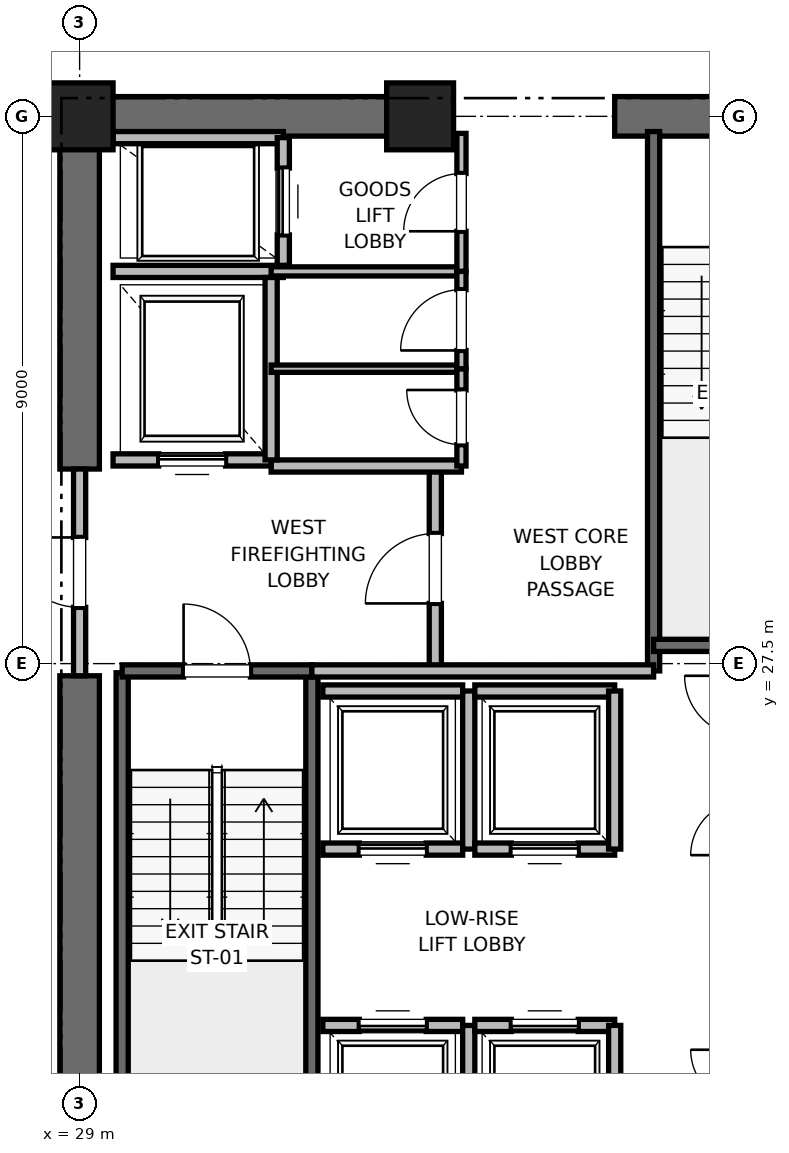
"""IFC4 building model, lengths in metres.
Left out: names, types, materials, properties, quantities, classifications, styles, units other than length and angle.
Written with IfcOpenShell. Run it as: python <this file> out.ifc"""

import sys

from ifc_helpers import new_model, si_unit, direction, frame, frame_2d, origin, origin_2d, place, context, subcontext, project, spatial, rectangle, extrude, element, fill, save


model = new_model("IFC4")
c1 = context("Model", 3, precision=1e-05, world=origin(), true_north=direction((0.0, 1.0)))
c2 = subcontext(c1, "Body", "Model", "MODEL_VIEW")
j1 = project(units=[si_unit("LENGTHUNIT", "METRE"), si_unit("PLANEANGLEUNIT", "RADIAN")], contexts=[c1])
p1 = place(None, origin())
s1 = spatial("IfcSite", under=j1, at=p1, CompositionType="ELEMENT")
p2 = place(p1, origin())
s2 = spatial("IfcBuilding", under=s1, at=p2, CompositionType="ELEMENT")
p3 = place(p2, frame((0.0, 0.0, 39.6)))
s3 = spatial("IfcBuildingStorey", under=s2, at=p3, CompositionType="ELEMENT", Elevation=39.6)
for number, where, z_axis, x_axis in (
    (1, (29.0, 36.5, 0.0), (0.0, 0.0, 1.0), (1.0, 0.0, 0.0)),
    (2, (34.6, 36.5, 0.0), (0.0, 0.0, 1.0), (1.0, 0.0, 0.0)),
):
    element("IfcColumn", number, at=place(p3, frame(where, z_axis=z_axis, x_axis=x_axis)), inside=s3, PredefinedType="PILASTER", context=c2, shape_type="SweptSolid", body=[
        extrude(rectangle(XDim=1.1, YDim=1.1, at=origin_2d()), origin(), (0.0, 0.0, 1.0), 4.0),
    ])
p4 = place(p3, frame((29.0, 36.5, 0.0), z_axis=(0.0, 0.0, 1.0), x_axis=(1.0, 0.0, 0.0)))
e3 = element("IfcWall", 3, at=p4, inside=s3, PredefinedType="SHEAR", context=c2, shape_type="SweptSolid", body=[
    extrude(rectangle(XDim=5.8, YDim=0.65, at=frame_2d((2.9, 0.0))), origin(), (0.0, 0.0, 1.0), 3.76),
])
p5 = place(p3, frame((37.8, 36.5, 0.0), z_axis=(0.0, 0.0, 1.0), x_axis=(1.0, 0.0, 0.0)))
e4 = element("IfcWall", 4, at=p5, inside=s3, PredefinedType="SHEAR", context=c2, shape_type="SweptSolid", body=[
    extrude(rectangle(XDim=4.4, YDim=0.65, at=frame_2d((2.2, 0.0))), origin(), (0.0, 0.0, 1.0), 3.76),
])
p6 = place(p5, frame((1.65, 0.0, 0.0)))
e5 = element("IfcOpeningElement", 5, at=p6, cuts=e4, PredefinedType="OPENING", context=c2, shape_type="SweptSolid", body=[
    extrude(rectangle(XDim=1.1, YDim=2.15, at=frame_2d((0.55, 1.075))), frame((0.0, 0.325, 0.0), z_axis=(0.0, -1.0, 0.0), x_axis=(1.0, 0.0, 0.0)), (0.0, 0.0, 1.0), 0.65),
])
p7 = place(p3, frame((29.0, 18.5, 0.0), z_axis=(0.0, 0.0, 1.0), x_axis=(0.0, 1.0, 0.0)))
e6 = element("IfcWall", 6, at=p7, inside=s3, PredefinedType="SHEAR", context=c2, shape_type="SweptSolid", body=[
    extrude(rectangle(XDim=8.8, YDim=0.65, at=frame_2d((4.4, 0.0))), origin(), (0.0, 0.0, 1.0), 3.76),
])
p8 = place(p3, frame((29.0, 30.7, 0.0), z_axis=(0.0, 0.0, 1.0), x_axis=(0.0, 1.0, 0.0)))
e7 = element("IfcWall", 7, at=p8, inside=s3, PredefinedType="SHEAR", context=c2, shape_type="SweptSolid", body=[
    extrude(rectangle(XDim=5.8, YDim=0.65, at=frame_2d((2.9, 0.0))), origin(), (0.0, 0.0, 1.0), 3.76),
])
p9 = place(p3, frame((29.7, 19.2, 0.0), z_axis=(0.0, 0.0, 1.0), x_axis=(0.0, 1.0, 0.0)))
e8 = element("IfcWall", 8, at=p9, inside=s3, PredefinedType="SOLIDWALL", context=c2, shape_type="SweptSolid", body=[
    extrude(rectangle(XDim=8.15, YDim=0.2, at=frame_2d((4.075, 0.0))), origin(), (0.0, 0.0, 1.0), 3.76),
])
p10 = place(p3, frame((32.82, 18.6, 0.0), z_axis=(0.0, 0.0, 1.0), x_axis=(0.0, 1.0, 0.0)))
e9 = element("IfcWall", 9, at=p10, inside=s3, PredefinedType="SOLIDWALL", context=c2, shape_type="SweptSolid", body=[
    extrude(rectangle(XDim=8.78, YDim=0.2, at=frame_2d((4.39, 0.0))), origin(), (0.0, 0.0, 1.0), 3.76),
])
p11 = place(p3, frame((29.7, 27.38, 0.0), z_axis=(0.0, 0.0, 1.0), x_axis=(1.0, 0.0, 0.0)))
e10 = element("IfcWall", 10, at=p11, inside=s3, PredefinedType="SOLIDWALL", context=c2, shape_type="SweptSolid", body=[
    extrude(rectangle(XDim=3.12, YDim=0.2, at=frame_2d((1.56, 0.0))), origin(), (0.0, 0.0, 1.0), 3.76),
])
p12 = place(p11, frame((1.01, 0.0, 0.0)))
e11 = element("IfcOpeningElement", 11, at=p12, cuts=e10, PredefinedType="OPENING", context=c2, shape_type="SweptSolid", body=[
    extrude(rectangle(XDim=1.1, YDim=2.15, at=frame_2d((0.55, 1.075))), frame((0.0, 0.1, 0.0), z_axis=(0.0, -1.0, 0.0), x_axis=(1.0, 0.0, 0.0)), (0.0, 0.0, 1.0), 0.2),
])
p13 = place(p3, frame((38.44, 27.38, 0.0), z_axis=(0.0, 0.0, 1.0), x_axis=(0.0, 1.0, 0.0)))
e12 = element("IfcWall", 12, at=p13, inside=s3, PredefinedType="SOLIDWALL", context=c2, shape_type="SweptSolid", body=[
    extrude(rectangle(XDim=8.87, YDim=0.2, at=frame_2d((4.435, 0.0))), origin(), (0.0, 0.0, 1.0), 3.76),
])
p14 = place(p3, frame((38.44, 27.8, 0.0), z_axis=(0.0, 0.0, 1.0), x_axis=(1.0, 0.0, 0.0)))
e13 = element("IfcWall", 13, at=p14, inside=s3, PredefinedType="SOLIDWALL", context=c2, shape_type="SweptSolid", body=[
    extrude(rectangle(XDim=3.32, YDim=0.2, at=frame_2d((1.66, 0.0))), origin(), (0.0, 0.0, 1.0), 3.76),
])
p15 = place(p3, frame((34.85, 27.38, 0.0), z_axis=(0.0, 0.0, 1.0), x_axis=(0.0, 1.0, 0.0)))
e14 = element("IfcWall", 14, at=p15, inside=s3, PredefinedType="PARTITIONING", context=c2, shape_type="SweptSolid", body=[
    extrude(rectangle(XDim=3.37, YDim=0.2, at=frame_2d((1.685, 0.0))), origin(), (0.0, 0.0, 1.0), 3.76),
])
p16 = place(p15, frame((1.11, 0.0, 0.0)))
e15 = element("IfcOpeningElement", 15, at=p16, cuts=e14, PredefinedType="OPENING", context=c2, shape_type="SweptSolid", body=[
    extrude(rectangle(XDim=1.15, YDim=2.2, at=frame_2d((0.575, 1.1))), frame((0.0, 0.1, 0.0), z_axis=(0.0, -1.0, 0.0), x_axis=(1.0, 0.0, 0.0)), (0.0, 0.0, 1.0), 0.2),
])
p17 = place(p3, frame((29.0, 27.3, 0.0), z_axis=(0.0, 0.0, 1.0), x_axis=(0.0, 1.0, 0.0)))
e16 = element("IfcWall", 16, at=p17, inside=s3, PredefinedType="PARTITIONING", context=c2, shape_type="SweptSolid", body=[
    extrude(rectangle(XDim=3.4, YDim=0.2, at=frame_2d((1.7, 0.0))), origin(), (0.0, 0.0, 1.0), 2.54),
])
p18 = place(p17, frame((1.125, 0.0, 0.0)))
e17 = element("IfcOpeningElement", 17, at=p18, cuts=e16, PredefinedType="OPENING", context=c2, shape_type="SweptSolid", body=[
    extrude(rectangle(XDim=1.15, YDim=2.2, at=frame_2d((0.575, 1.1))), frame((0.0, 0.1, 0.0), z_axis=(0.0, -1.0, 0.0), x_axis=(1.0, 0.0, 0.0)), (0.0, 0.0, 1.0), 0.2),
])
p19 = place(p3, frame((32.82, 27.38, 0.0), z_axis=(0.0, 0.0, 1.0), x_axis=(1.0, 0.0, 0.0)))
e18 = element("IfcWall", 18, at=p19, inside=s3, PredefinedType="PARTITIONING", context=c2, shape_type="SweptSolid", body=[
    extrude(rectangle(XDim=5.62, YDim=0.2, at=frame_2d((2.81, 0.0))), origin(), (0.0, 0.0, 1.0), 3.76),
])
p20 = place(p3, frame((32.15, 30.75, 0.0), z_axis=(0.0, 0.0, 1.0), x_axis=(1.0, 0.0, 0.0)))
e19 = element("IfcWall", 19, at=p20, inside=s3, PredefinedType="PARTITIONING", context=c2, shape_type="SweptSolid", body=[
    extrude(rectangle(XDim=3.13, YDim=0.2, at=frame_2d((1.565, 0.0))), origin(), (0.0, 0.0, 1.0), 3.76),
])
p21 = place(p3, frame((29.55, 30.85, 0.0), z_axis=(0.0, 0.0, 1.0), x_axis=(1.0, 0.0, 0.0)))
e20 = element("IfcWall", 20, at=p21, inside=s3, PredefinedType="SOLIDWALL", context=c2, shape_type="SweptSolid", body=[
    extrude(rectangle(XDim=2.6, YDim=0.2, at=frame_2d((1.3, 0.0))), origin(), (0.0, 0.0, 1.0), 2.54),
])
p22 = place(p21, frame((0.75, 0.0, 0.0)))
e21 = element("IfcOpeningElement", 21, at=p22, cuts=e20, PredefinedType="OPENING", context=c2, shape_type="SweptSolid", body=[
    extrude(rectangle(XDim=1.1, YDim=2.2, at=frame_2d((0.55, 1.1))), frame((0.0, 0.1, 0.0), z_axis=(0.0, -1.0, 0.0), x_axis=(1.0, 0.0, 0.0)), (0.0, 0.0, 1.0), 0.2),
])
p23 = place(p3, frame((29.55, 33.95, 0.0), z_axis=(0.0, 0.0, 1.0), x_axis=(1.0, 0.0, 0.0)))
e22 = element("IfcWall", 22, at=p23, inside=s3, PredefinedType="SOLIDWALL", context=c2, shape_type="SweptSolid", body=[
    extrude(rectangle(XDim=2.8, YDim=0.2, at=frame_2d((1.4, 0.0))), origin(), (0.0, 0.0, 1.0), 3.76),
])
p24 = place(p3, frame((32.15, 30.85, 0.0), z_axis=(0.0, 0.0, 1.0), x_axis=(0.0, 1.0, 0.0)))
e23 = element("IfcWall", 23, at=p24, inside=s3, PredefinedType="SOLIDWALL", context=c2, shape_type="SweptSolid", body=[
    extrude(rectangle(XDim=3.0, YDim=0.2, at=frame_2d((1.5, 0.0))), origin(), (0.0, 0.0, 1.0), 3.76),
])
p25 = place(p3, frame((32.35, 36.15, 0.0), z_axis=(0.0, 0.0, 1.0), x_axis=(-1.0, 0.0, 0.0)))
e24 = element("IfcWall", 24, at=p25, inside=s3, PredefinedType="SOLIDWALL", context=c2, shape_type="SweptSolid", body=[
    extrude(rectangle(XDim=2.8, YDim=0.2, at=frame_2d((1.4, 0.0))), origin(), (0.0, 0.0, 1.0), 2.889),
])
p26 = place(p3, frame((32.35, 34.05, 0.0), z_axis=(0.0, 0.0, 1.0), x_axis=(0.0, 1.0, 0.0)))
e25 = element("IfcWall", 25, at=p26, inside=s3, PredefinedType="SOLIDWALL", context=c2, shape_type="SweptSolid", body=[
    extrude(rectangle(XDim=2.1, YDim=0.2, at=frame_2d((1.05, 0.0))), origin(), (0.0, 0.0, 1.0), 3.76),
])
p27 = place(p26, frame((0.5, 0.0, 0.0)))
e26 = element("IfcOpeningElement", 26, at=p27, cuts=e25, PredefinedType="OPENING", context=c2, shape_type="SweptSolid", body=[
    extrude(rectangle(XDim=1.1, YDim=2.2, at=frame_2d((0.55, 1.1))), frame((0.0, 0.1, 0.0), z_axis=(0.0, -1.0, 0.0), x_axis=(1.0, 0.0, 0.0)), (0.0, 0.0, 1.0), 0.2),
])
p28 = place(p3, frame((35.3, 21.55, 0.0), z_axis=(0.0, 0.0, 1.0), x_axis=(-1.0, 0.0, 0.0)))
e27 = element("IfcWall", 27, at=p28, inside=s3, PredefinedType="SOLIDWALL", context=c2, shape_type="SweptSolid", body=[
    extrude(rectangle(XDim=2.3, YDim=0.2, at=frame_2d((1.15, 0.0))), origin(), (0.0, 0.0, 1.0), 3.76),
])
p29 = place(p28, frame((0.6, 0.0, 0.0)))
e28 = element("IfcOpeningElement", 28, at=p29, cuts=e27, PredefinedType="OPENING", context=c2, shape_type="SweptSolid", body=[
    extrude(rectangle(XDim=1.1, YDim=2.2, at=frame_2d((0.55, 1.1))), frame((0.0, 0.1, 0.0), z_axis=(0.0, -1.0, 0.0), x_axis=(1.0, 0.0, 0.0)), (0.0, 0.0, 1.0), 0.2),
])
p30 = place(p3, frame((35.4, 18.95, 0.0), z_axis=(0.0, 0.0, 1.0), x_axis=(0.0, 1.0, 0.0)))
e29 = element("IfcWall", 29, at=p30, inside=s3, PredefinedType="SOLIDWALL", context=c2, shape_type="SweptSolid", body=[
    extrude(rectangle(XDim=2.6, YDim=0.2, at=frame_2d((1.3, 0.0))), origin(), (0.0, 0.0, 1.0), 3.76),
])
p31 = place(p3, frame((37.8, 21.55, 0.0), z_axis=(0.0, 0.0, 1.0), x_axis=(-1.0, 0.0, 0.0)))
e30 = element("IfcWall", 30, at=p31, inside=s3, PredefinedType="SOLIDWALL", context=c2, shape_type="SweptSolid", body=[
    extrude(rectangle(XDim=2.3, YDim=0.2, at=frame_2d((1.15, 0.0))), origin(), (0.0, 0.0, 1.0), 3.76),
])
p32 = place(p31, frame((0.6, 0.0, 0.0)))
e31 = element("IfcOpeningElement", 31, at=p32, cuts=e30, PredefinedType="OPENING", context=c2, shape_type="SweptSolid", body=[
    extrude(rectangle(XDim=1.1, YDim=2.2, at=frame_2d((0.55, 1.1))), frame((0.0, 0.1, 0.0), z_axis=(0.0, -1.0, 0.0), x_axis=(1.0, 0.0, 0.0)), (0.0, 0.0, 1.0), 0.2),
])
p33 = place(p3, frame((37.8, 18.95, 0.0), z_axis=(0.0, 0.0, 1.0), x_axis=(0.0, 1.0, 0.0)))
e32 = element("IfcWall", 32, at=p33, inside=s3, PredefinedType="SOLIDWALL", context=c2, shape_type="SweptSolid", body=[
    extrude(rectangle(XDim=2.6, YDim=0.2, at=frame_2d((1.3, 0.0))), origin(), (0.0, 0.0, 1.0), 2.54),
])
p34 = place(p3, frame((33.0, 24.45, 0.0), z_axis=(0.0, 0.0, 1.0), x_axis=(1.0, 0.0, 0.0)))
e33 = element("IfcWall", 33, at=p34, inside=s3, PredefinedType="SOLIDWALL", context=c2, shape_type="SweptSolid", body=[
    extrude(rectangle(XDim=2.3, YDim=0.2, at=frame_2d((1.15, 0.0))), origin(), (0.0, 0.0, 1.0), 3.76),
])
p35 = place(p34, frame((0.6, 0.0, 0.0)))
e34 = element("IfcOpeningElement", 34, at=p35, cuts=e33, PredefinedType="OPENING", context=c2, shape_type="SweptSolid", body=[
    extrude(rectangle(XDim=1.1, YDim=2.2, at=frame_2d((0.55, 1.1))), frame((0.0, 0.1, 0.0), z_axis=(0.0, -1.0, 0.0), x_axis=(1.0, 0.0, 0.0)), (0.0, 0.0, 1.0), 0.2),
])
p36 = place(p3, frame((35.3, 27.05, 0.0), z_axis=(0.0, 0.0, 1.0), x_axis=(-1.0, 0.0, 0.0)))
e35 = element("IfcWall", 35, at=p36, inside=s3, PredefinedType="SOLIDWALL", context=c2, shape_type="SweptSolid", body=[
    extrude(rectangle(XDim=2.3, YDim=0.2, at=frame_2d((1.15, 0.0))), origin(), (0.0, 0.0, 1.0), 3.76),
])
p37 = place(p3, frame((35.4, 24.45, 0.0), z_axis=(0.0, 0.0, 1.0), x_axis=(0.0, 1.0, 0.0)))
e36 = element("IfcWall", 36, at=p37, inside=s3, PredefinedType="SOLIDWALL", context=c2, shape_type="SweptSolid", body=[
    extrude(rectangle(XDim=2.6, YDim=0.2, at=frame_2d((1.3, 0.0))), origin(), (0.0, 0.0, 1.0), 3.76),
])
p38 = place(p3, frame((35.5, 24.45, 0.0), z_axis=(0.0, 0.0, 1.0), x_axis=(1.0, 0.0, 0.0)))
e37 = element("IfcWall", 37, at=p38, inside=s3, PredefinedType="SOLIDWALL", context=c2, shape_type="SweptSolid", body=[
    extrude(rectangle(XDim=2.3, YDim=0.2, at=frame_2d((1.15, 0.0))), origin(), (0.0, 0.0, 1.0), 3.76),
])
p39 = place(p38, frame((0.6, 0.0, 0.0)))
e38 = element("IfcOpeningElement", 38, at=p39, cuts=e37, PredefinedType="OPENING", context=c2, shape_type="SweptSolid", body=[
    extrude(rectangle(XDim=1.1, YDim=2.2, at=frame_2d((0.55, 1.1))), frame((0.0, 0.1, 0.0), z_axis=(0.0, -1.0, 0.0), x_axis=(1.0, 0.0, 0.0)), (0.0, 0.0, 1.0), 0.2),
])
p40 = place(p3, frame((37.8, 27.05, 0.0), z_axis=(0.0, 0.0, 1.0), x_axis=(-1.0, 0.0, 0.0)))
e39 = element("IfcWall", 39, at=p40, inside=s3, PredefinedType="SOLIDWALL", context=c2, shape_type="SweptSolid", body=[
    extrude(rectangle(XDim=2.3, YDim=0.2, at=frame_2d((1.15, 0.0))), origin(), (0.0, 0.0, 1.0), 3.76),
])
p41 = place(p3, frame((37.8, 24.45, 0.0), z_axis=(0.0, 0.0, 1.0), x_axis=(0.0, 1.0, 0.0)))
e40 = element("IfcWall", 40, at=p41, inside=s3, PredefinedType="SOLIDWALL", context=c2, shape_type="SweptSolid", body=[
    extrude(rectangle(XDim=2.6, YDim=0.2, at=frame_2d((1.3, 0.0))), origin(), (0.0, 0.0, 1.0), 3.76),
])
p42 = place(p3, frame((32.15, 33.95, 0.0), z_axis=(0.0, 0.0, 1.0), x_axis=(1.0, 0.0, 0.0)))
e41 = element("IfcWall", 41, at=p42, inside=s3, PredefinedType="PARTITIONING", context=c2, shape_type="SweptSolid", body=[
    extrude(rectangle(XDim=3.13, YDim=0.15, at=frame_2d((1.565, 0.0))), origin(), (0.0, 0.0, 1.0), 2.85),
])
p43 = place(p3, frame((35.28, 33.95, 0.0), z_axis=(0.0, 0.0, 1.0), x_axis=(0.0, 1.0, 0.0)))
e42 = element("IfcWall", 42, at=p43, inside=s3, PredefinedType="PARTITIONING", context=c2, shape_type="SweptSolid", body=[
    extrude(rectangle(XDim=2.27, YDim=0.15, at=frame_2d((1.135, 0.0))), origin(), (0.0, 0.0, 1.0), 2.54),
])
p44 = place(p43, frame((0.66, 0.0, 0.0)))
e43 = element("IfcOpeningElement", 43, at=p44, cuts=e42, PredefinedType="OPENING", context=c2, shape_type="SweptSolid", body=[
    extrude(rectangle(XDim=0.95, YDim=2.15, at=frame_2d((0.475, 1.075))), frame((0.0, 0.075, 0.0), z_axis=(0.0, -1.0, 0.0), x_axis=(1.0, 0.0, 0.0)), (0.0, 0.0, 1.0), 0.15),
])
p45 = place(p3, frame((32.15, 32.35, 0.0), z_axis=(0.0, 0.0, 1.0), x_axis=(1.0, 0.0, 0.0)))
e44 = element("IfcWall", 44, at=p45, inside=s3, PredefinedType="PARTITIONING", context=c2, shape_type="SweptSolid", body=[
    extrude(rectangle(XDim=3.13, YDim=0.12, at=frame_2d((1.565, 0.0))), origin(), (0.0, 0.0, 1.0), 2.85),
])
p46 = place(p3, frame((35.28, 30.75, 0.0), z_axis=(0.0, 0.0, 1.0), x_axis=(0.0, 1.0, 0.0)))
e45 = element("IfcWall", 45, at=p46, inside=s3, PredefinedType="PARTITIONING", context=c2, shape_type="SweptSolid", body=[
    extrude(rectangle(XDim=1.6, YDim=0.15, at=frame_2d((0.8, 0.0))), origin(), (0.0, 0.0, 1.0), 2.85),
])
p47 = place(p46, frame((0.35, 0.0, 0.0)))
e46 = element("IfcOpeningElement", 46, at=p47, cuts=e45, PredefinedType="OPENING", context=c2, shape_type="SweptSolid", body=[
    extrude(rectangle(XDim=0.9, YDim=2.1, at=frame_2d((0.45, 1.05))), frame((0.0, 0.075, 0.0), z_axis=(0.0, -1.0, 0.0), x_axis=(1.0, 0.0, 0.0)), (0.0, 0.0, 1.0), 0.15),
])
p48 = place(p3, frame((35.28, 32.35, 0.0), z_axis=(0.0, 0.0, 1.0), x_axis=(0.0, 1.0, 0.0)))
e47 = element("IfcWall", 47, at=p48, inside=s3, PredefinedType="PARTITIONING", context=c2, shape_type="SweptSolid", body=[
    extrude(rectangle(XDim=1.6, YDim=0.15, at=frame_2d((0.8, 0.0))), origin(), (0.0, 0.0, 1.0), 2.85),
])
p49 = place(p48, frame((0.3, 0.0, 0.0)))
e48 = element("IfcOpeningElement", 48, at=p49, cuts=e47, PredefinedType="OPENING", context=c2, shape_type="SweptSolid", body=[
    extrude(rectangle(XDim=1.0, YDim=2.15, at=frame_2d((0.5, 1.075))), frame((0.0, 0.075, 0.0), z_axis=(0.0, -1.0, 0.0), x_axis=(1.0, 0.0, 0.0)), (0.0, 0.0, 1.0), 0.15),
])
p50 = place(p12, origin())
e49 = element("IfcDoor", 49, at=p50, inside=s3, OperationType="SINGLE_SWING_LEFT", PredefinedType="DOOR", context=c2, shape_type="SweptSolid", body=[
    extrude(rectangle(XDim=1.1, YDim=2.15, at=frame_2d((0.55, 1.075))), frame((0.0, 0.025, 0.0), z_axis=(0.0, -1.0, 0.0), x_axis=(1.0, 0.0, 0.0)), (0.0, 0.0, 1.0), 0.05),
])
fill(e11, e49)
p51 = place(p16, origin())
e50 = element("IfcDoor", 50, at=p51, inside=s3, OperationType="SINGLE_SWING_LEFT", PredefinedType="DOOR", context=c2, shape_type="SweptSolid", body=[
    extrude(rectangle(XDim=1.15, YDim=2.2, at=frame_2d((0.575, 1.1))), frame((0.0, 0.025, 0.0), z_axis=(0.0, -1.0, 0.0), x_axis=(1.0, 0.0, 0.0)), (0.0, 0.0, 1.0), 0.05),
])
fill(e15, e50)
p52 = place(p18, origin())
e51 = element("IfcDoor", 51, at=p52, inside=s3, OperationType="SINGLE_SWING_RIGHT", PredefinedType="DOOR", context=c2, shape_type="SweptSolid", body=[
    extrude(rectangle(XDim=1.15, YDim=2.2, at=frame_2d((0.575, 1.1))), frame((0.0, 0.025, 0.0), z_axis=(0.0, -1.0, 0.0), x_axis=(1.0, 0.0, 0.0)), (0.0, 0.0, 1.0), 0.05),
])
fill(e17, e51)
p53 = place(p22, origin())
e52 = element("IfcDoor", 52, at=p53, inside=s3, OperationType="SLIDING_TO_RIGHT", PredefinedType="DOOR", context=c2, shape_type="SweptSolid", body=[
    extrude(rectangle(XDim=1.1, YDim=2.2, at=frame_2d((0.55, 1.1))), frame((0.0, 0.025, 0.0), z_axis=(0.0, -1.0, 0.0), x_axis=(1.0, 0.0, 0.0)), (0.0, 0.0, 1.0), 0.05),
])
fill(e21, e52)
p54 = place(p27, origin())
e53 = element("IfcDoor", 53, at=p54, inside=s3, OperationType="SLIDING_TO_RIGHT", PredefinedType="DOOR", context=c2, shape_type="SweptSolid", body=[
    extrude(rectangle(XDim=1.1, YDim=2.2, at=frame_2d((0.55, 1.1))), frame((0.0, 0.025, 0.0), z_axis=(0.0, -1.0, 0.0), x_axis=(1.0, 0.0, 0.0)), (0.0, 0.0, 1.0), 0.05),
])
fill(e26, e53)
p55 = place(p29, origin())
e54 = element("IfcDoor", 54, at=p55, inside=s3, OperationType="SLIDING_TO_RIGHT", PredefinedType="DOOR", context=c2, shape_type="SweptSolid", body=[
    extrude(rectangle(XDim=1.1, YDim=2.2, at=frame_2d((0.55, 1.1))), frame((0.0, 0.025, 0.0), z_axis=(0.0, -1.0, 0.0), x_axis=(1.0, 0.0, 0.0)), (0.0, 0.0, 1.0), 0.05),
])
fill(e28, e54)
p56 = place(p32, origin())
e55 = element("IfcDoor", 55, at=p56, inside=s3, OperationType="SLIDING_TO_RIGHT", PredefinedType="DOOR", context=c2, shape_type="SweptSolid", body=[
    extrude(rectangle(XDim=1.1, YDim=2.2, at=frame_2d((0.55, 1.1))), frame((0.0, 0.025, 0.0), z_axis=(0.0, -1.0, 0.0), x_axis=(1.0, 0.0, 0.0)), (0.0, 0.0, 1.0), 0.05),
])
fill(e31, e55)
p57 = place(p35, origin())
e56 = element("IfcDoor", 56, at=p57, inside=s3, OperationType="SLIDING_TO_RIGHT", PredefinedType="DOOR", context=c2, shape_type="SweptSolid", body=[
    extrude(rectangle(XDim=1.1, YDim=2.2, at=frame_2d((0.55, 1.1))), frame((0.0, 0.025, 0.0), z_axis=(0.0, -1.0, 0.0), x_axis=(1.0, 0.0, 0.0)), (0.0, 0.0, 1.0), 0.05),
])
fill(e34, e56)
p58 = place(p39, origin())
e57 = element("IfcDoor", 57, at=p58, inside=s3, OperationType="SLIDING_TO_RIGHT", PredefinedType="DOOR", context=c2, shape_type="SweptSolid", body=[
    extrude(rectangle(XDim=1.1, YDim=2.2, at=frame_2d((0.55, 1.1))), frame((0.0, 0.025, 0.0), z_axis=(0.0, -1.0, 0.0), x_axis=(1.0, 0.0, 0.0)), (0.0, 0.0, 1.0), 0.05),
])
fill(e38, e57)
p59 = place(p44, origin())
e58 = element("IfcDoor", 58, at=p59, inside=s3, OperationType="SINGLE_SWING_LEFT", PredefinedType="DOOR", context=c2, shape_type="SweptSolid", body=[
    extrude(rectangle(XDim=0.95, YDim=2.15, at=frame_2d((0.475, 1.075))), frame((0.0, 0.025, 0.0), z_axis=(0.0, -1.0, 0.0), x_axis=(1.0, 0.0, 0.0)), (0.0, 0.0, 1.0), 0.05),
])
fill(e43, e58)
p60 = place(p47, origin())
e59 = element("IfcDoor", 59, at=p60, inside=s3, OperationType="SINGLE_SWING_RIGHT", PredefinedType="DOOR", context=c2, shape_type="SweptSolid", body=[
    extrude(rectangle(XDim=0.9, YDim=2.1, at=frame_2d((0.45, 1.05))), frame((0.0, 0.025, 0.0), z_axis=(0.0, -1.0, 0.0), x_axis=(1.0, 0.0, 0.0)), (0.0, 0.0, 1.0), 0.05),
])
fill(e46, e59)
p61 = place(p49, origin())
e60 = element("IfcDoor", 60, at=p61, inside=s3, OperationType="SINGLE_SWING_LEFT", PredefinedType="DOOR", context=c2, shape_type="SweptSolid", body=[
    extrude(rectangle(XDim=1.0, YDim=2.15, at=frame_2d((0.5, 1.075))), frame((0.0, 0.025, 0.0), z_axis=(0.0, -1.0, 0.0), x_axis=(1.0, 0.0, 0.0)), (0.0, 0.0, 1.0), 0.05),
])
fill(e48, e60)
save(model, sys.argv[1])
